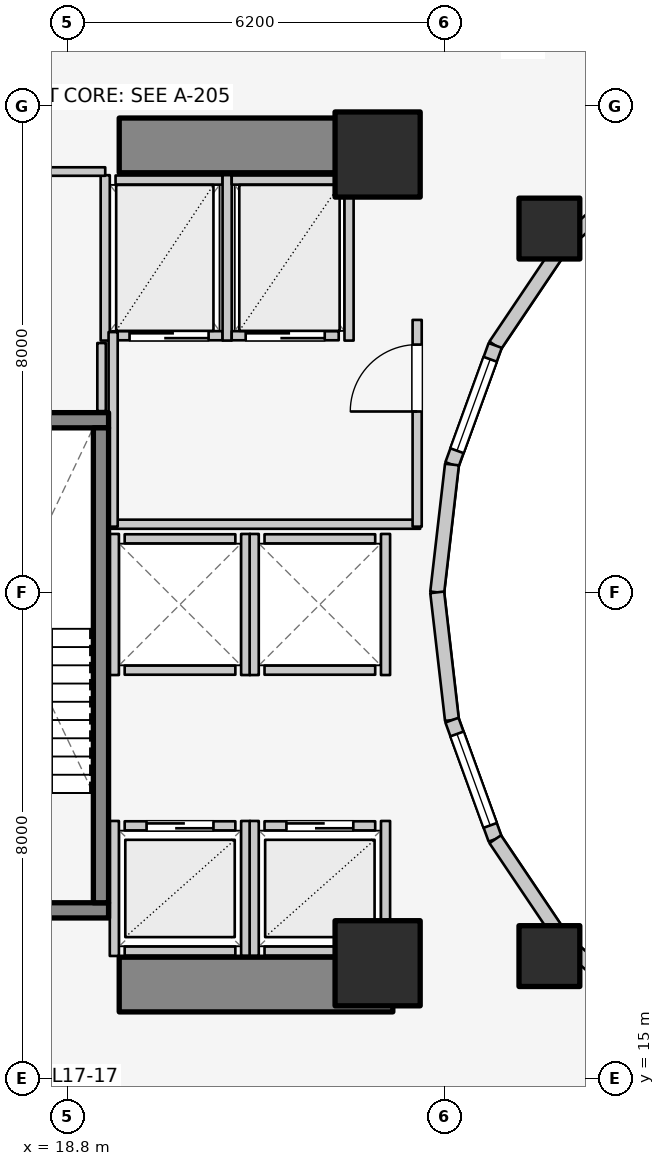
"""IFC4 building model, lengths in metres.
Left out: names, types, materials, properties, quantities, classifications, styles, units other than length and angle.
Written with IfcOpenShell. Run it as: python <this file> out.ifc"""

import sys

from ifc_helpers import new_model, si_unit, direction, frame, frame_2d, origin, origin_2d, place, context, subcontext, project, spatial, rectangle, extrude, element, fill, save


model = new_model("IFC4")
c1 = context("Model", 3, precision=1e-05, world=origin(), true_north=direction((0.0, 1.0)))
c2 = subcontext(c1, "Body", "Model", "MODEL_VIEW")
j1 = project(units=[si_unit("LENGTHUNIT", "METRE"), si_unit("PLANEANGLEUNIT", "RADIAN")], contexts=[c1])
p1 = place(None, origin())
s1 = spatial("IfcSite", under=j1, at=p1, CompositionType="ELEMENT")
p2 = place(p1, origin())
s2 = spatial("IfcBuilding", under=s1, at=p2, CompositionType="ELEMENT")
p3 = place(p2, frame((0.0, 0.0, 58.6)))
s3 = spatial("IfcBuildingStorey", under=s2, at=p3, CompositionType="ELEMENT", Elevation=58.6)
for number, where, z_axis, x_axis in (
    (1, (19.65, 16.55, 0.0), (0.0, 0.0, 1.0), (1.0, 0.0, 0.0)),
    (2, (19.65, 30.35, 0.0), (0.0, 0.0, 1.0), (1.0, 0.0, 0.0)),
):
    element("IfcWall", number, at=place(p3, frame(where, z_axis=z_axis, x_axis=x_axis)), inside=s3, PredefinedType="SHEAR", context=c2, shape_type="SweptSolid", body=[
        extrude(rectangle(XDim=4.5, YDim=0.9, at=frame_2d((2.25, 0.0))), origin(), (0.0, 0.0, 1.0), 3.1),
    ])
p4 = place(p3, frame((16.105, 17.77, 0.0), z_axis=(0.0, 0.0, 1.0), x_axis=(1.0, 0.0, 0.0)))
e3 = element("IfcWall", 3, at=p4, inside=s3, PredefinedType="SOLIDWALL", context=c2, shape_type="SweptSolid", body=[
    extrude(rectangle(XDim=3.37, YDim=0.25, at=frame_2d((1.685, 0.0))), origin(), (0.0, 0.0, 1.0), 3.1),
])
p5 = place(p4, frame((1.135, 0.0, 0.0)))
e4 = element("IfcOpeningElement", 4, at=p5, cuts=e3, PredefinedType="OPENING", context=c2, shape_type="SweptSolid", body=[
    extrude(rectangle(XDim=1.1, YDim=2.1, at=frame_2d((0.55, 1.05))), frame((0.0, 0.135, 0.0), z_axis=(0.0, -1.0, 0.0), x_axis=(1.0, 0.0, 0.0)), (0.0, 0.0, 1.0), 0.27),
])
p6 = place(p3, frame((16.105, 25.83, 0.0), z_axis=(0.0, 0.0, 1.0), x_axis=(1.0, 0.0, 0.0)))
e5 = element("IfcWall", 5, at=p6, inside=s3, PredefinedType="SOLIDWALL", context=c2, shape_type="SweptSolid", body=[
    extrude(rectangle(XDim=3.37, YDim=0.25, at=frame_2d((1.685, 0.0))), origin(), (0.0, 0.0, 1.0), 3.1),
])
p7 = place(p3, frame((19.35, 17.895, 0.0), z_axis=(0.0, 0.0, 1.0), x_axis=(0.0, 1.0, 0.0)))
e6 = element("IfcWall", 6, at=p7, inside=s3, PredefinedType="SOLIDWALL", context=c2, shape_type="SweptSolid", body=[
    extrude(rectangle(XDim=7.81, YDim=0.25, at=frame_2d((3.905, 0.0))), origin(), (0.0, 0.0, 1.0), 3.1),
])
for number, where, z_axis, x_axis in (
    (7, (23.9, 16.9, 0.0), (0.0, 0.0, 1.0), (1.0, 0.0, 0.0)),
    (8, (23.9, 30.2, 0.0), (0.0, 0.0, 1.0), (1.0, 0.0, 0.0)),
):
    element("IfcColumn", number, at=place(p3, frame(where, z_axis=z_axis, x_axis=x_axis)), inside=s3, PredefinedType="COLUMN", context=c2, shape_type="SweptSolid", body=[
        extrude(rectangle(XDim=1.4, YDim=1.4, at=origin_2d()), origin(), (0.0, 0.0, 1.0), 3.1),
    ])
for number, where, z_axis, x_axis in (
    (9, (26.725, 28.982, 0.0), (0.0, 0.0, 1.0), (1.0, 0.0, 0.0)),
    (10, (26.725, 17.018, 0.0), (0.0, 0.0, 1.0), (1.0, 0.0, 0.0)),
):
    element("IfcColumn", number, at=place(p3, frame(where, z_axis=z_axis, x_axis=x_axis)), inside=s3, PredefinedType="COLUMN", context=c2, shape_type="SweptSolid", body=[
        extrude(rectangle(XDim=1.0, YDim=1.0, at=origin_2d()), origin(), (0.0, 0.0, 1.0), 3.1),
    ])
p8 = place(p3, frame((28.44, 30.032, 0.0), z_axis=(0.0, 0.0, 1.0), x_axis=(-0.752576694707, -0.658504607869, 0.0)))
e11 = element("IfcWall", 11, at=p8, inside=s3, PredefinedType="STANDARD", context=c2, shape_type="SweptSolid", body=[
    extrude(rectangle(XDim=1.959, YDim=0.23, at=frame_2d((0.98, 0.0))), origin(), (0.0, 0.0, 1.0), 2.16),
])
p9 = place(p3, frame((26.965, 28.742, 0.0), z_axis=(0.0, 0.0, 1.0), x_axis=(-0.558197800898, -0.829707909492, 0.0)))
e12 = element("IfcWall", 12, at=p9, inside=s3, PredefinedType="STANDARD", context=c2, shape_type="SweptSolid", body=[
    extrude(rectangle(XDim=2.027, YDim=0.23, at=frame_2d((1.013, 0.0))), origin(), (0.0, 0.0, 1.0), 2.16),
])
p10 = place(p3, frame((25.834, 27.06, 0.0), z_axis=(0.0, 0.0, 1.0), x_axis=(-0.341423187295, -0.93990968033, 0.0)))
e13 = element("IfcWall", 13, at=p10, inside=s3, PredefinedType="STANDARD", context=c2, shape_type="SweptSolid", body=[
    extrude(rectangle(XDim=2.084, YDim=0.23, at=frame_2d((1.042, 0.0))), origin(), (0.0, 0.0, 1.0), 2.84),
])
p11 = place(p10, frame((0.242, 0.0, 0.85)))
e14 = element("IfcOpeningElement", 14, at=p11, cuts=e13, PredefinedType="OPENING", context=c2, shape_type="SweptSolid", body=[
    extrude(rectangle(XDim=1.6, YDim=1.65, at=frame_2d((0.8, 0.825))), frame((0.0, 0.125, 0.0), z_axis=(0.0, -1.0, 0.0), x_axis=(1.0, 0.0, 0.0)), (0.0, 0.0, 1.0), 0.25),
])
for number, where, z_axis, x_axis in (
    (15, (25.123, 25.102, 0.0), (0.0, 0.0, 1.0), (-0.115, -0.993, 0.0)),
    (16, (24.88, 23.0, 0.0), (0.0, 0.0, 1.0), (0.115, -0.993, 0.0)),
):
    element("IfcWall", number, at=place(p3, frame(where, z_axis=z_axis, x_axis=x_axis)), inside=s3, PredefinedType="STANDARD", context=c2, shape_type="SweptSolid", body=[
        extrude(rectangle(XDim=2.115, YDim=0.23, at=frame_2d((1.058, 0.0))), origin(), (0.0, 0.0, 1.0), 2.84),
    ])
p12 = place(p3, frame((25.123, 20.898, 0.0), z_axis=(0.0, 0.0, 1.0), x_axis=(0.341423187295, -0.93990968033, 0.0)))
e17 = element("IfcWall", 17, at=p12, inside=s3, PredefinedType="STANDARD", context=c2, shape_type="SweptSolid", body=[
    extrude(rectangle(XDim=2.084, YDim=0.23, at=frame_2d((1.042, 0.0))), origin(), (0.0, 0.0, 1.0), 2.84),
])
p13 = place(p12, frame((0.242, 0.0, 0.85)))
e18 = element("IfcOpeningElement", 18, at=p13, cuts=e17, PredefinedType="OPENING", context=c2, shape_type="SweptSolid", body=[
    extrude(rectangle(XDim=1.6, YDim=1.65, at=frame_2d((0.8, 0.825))), frame((0.0, 0.125, 0.0), z_axis=(0.0, -1.0, 0.0), x_axis=(1.0, 0.0, 0.0)), (0.0, 0.0, 1.0), 0.25),
])
p14 = place(p3, frame((25.834, 18.94, 0.0), z_axis=(0.0, 0.0, 1.0), x_axis=(0.558197800898, -0.829707909492, 0.0)))
e19 = element("IfcWall", 19, at=p14, inside=s3, PredefinedType="STANDARD", context=c2, shape_type="SweptSolid", body=[
    extrude(rectangle(XDim=2.027, YDim=0.23, at=frame_2d((1.013, 0.0))), origin(), (0.0, 0.0, 1.0), 2.16),
])
p15 = place(p3, frame((26.965, 17.258, 0.0), z_axis=(0.0, 0.0, 1.0), x_axis=(0.752576694707, -0.658504607869, 0.0)))
e20 = element("IfcWall", 20, at=p15, inside=s3, PredefinedType="STANDARD", context=c2, shape_type="SweptSolid", body=[
    extrude(rectangle(XDim=1.959, YDim=0.23, at=frame_2d((0.98, 0.0))), origin(), (0.0, 0.0, 1.0), 2.16),
])
p16 = place(p3, frame((19.74, 19.16, 0.0), z_axis=(0.0, 0.0, 1.0), x_axis=(1.0, 0.0, 0.0)))
e21 = element("IfcWall", 21, at=p16, inside=s3, PredefinedType="SOLIDWALL", context=c2, shape_type="SweptSolid", body=[
    extrude(rectangle(XDim=1.82, YDim=0.15, at=frame_2d((0.91, 0.0))), origin(), (0.0, 0.0, 1.0), 2.855),
])
p17 = place(p16, frame((0.36, 0.0, 0.0)))
e22 = element("IfcOpeningElement", 22, at=p17, cuts=e21, PredefinedType="OPENING", context=c2, shape_type="SweptSolid", body=[
    extrude(rectangle(XDim=1.1, YDim=2.1, at=frame_2d((0.55, 1.05))), frame((0.0, 0.085, 0.0), z_axis=(0.0, -1.0, 0.0), x_axis=(1.0, 0.0, 0.0)), (0.0, 0.0, 1.0), 0.17),
])
p18 = place(p3, frame((19.74, 17.1, 0.0), z_axis=(0.0, 0.0, 1.0), x_axis=(1.0, 0.0, 0.0)))
e23 = element("IfcWall", 23, at=p18, inside=s3, PredefinedType="SOLIDWALL", context=c2, shape_type="SweptSolid", body=[
    extrude(rectangle(XDim=1.82, YDim=0.15, at=frame_2d((0.91, 0.0))), origin(), (0.0, 0.0, 1.0), 2.855),
])
p19 = place(p3, frame((19.57, 17.02, 0.0), z_axis=(0.0, 0.0, 1.0), x_axis=(0.0, 1.0, 0.0)))
e24 = element("IfcWall", 24, at=p19, inside=s3, PredefinedType="SOLIDWALL", context=c2, shape_type="SweptSolid", body=[
    extrude(rectangle(XDim=2.22, YDim=0.15, at=frame_2d((1.11, 0.0))), origin(), (0.0, 0.0, 1.0), 2.12),
])
p20 = place(p3, frame((21.73, 17.02, 0.0), z_axis=(0.0, 0.0, 1.0), x_axis=(0.0, 1.0, 0.0)))
e25 = element("IfcWall", 25, at=p20, inside=s3, PredefinedType="SOLIDWALL", context=c2, shape_type="SweptSolid", body=[
    extrude(rectangle(XDim=2.22, YDim=0.15, at=frame_2d((1.11, 0.0))), origin(), (0.0, 0.0, 1.0), 2.855),
])
p21 = place(p3, frame((22.04, 19.16, 0.0), z_axis=(0.0, 0.0, 1.0), x_axis=(1.0, 0.0, 0.0)))
e26 = element("IfcWall", 26, at=p21, inside=s3, PredefinedType="SOLIDWALL", context=c2, shape_type="SweptSolid", body=[
    extrude(rectangle(XDim=1.82, YDim=0.15, at=frame_2d((0.91, 0.0))), origin(), (0.0, 0.0, 1.0), 2.12),
])
p22 = place(p21, frame((0.36, 0.0, 0.0)))
e27 = element("IfcOpeningElement", 27, at=p22, cuts=e26, PredefinedType="OPENING", context=c2, shape_type="SweptSolid", body=[
    extrude(rectangle(XDim=1.1, YDim=2.1, at=frame_2d((0.55, 1.05))), frame((0.0, 0.085, 0.0), z_axis=(0.0, -1.0, 0.0), x_axis=(1.0, 0.0, 0.0)), (0.0, 0.0, 1.0), 0.17),
])
p23 = place(p3, frame((22.04, 17.1, 0.0), z_axis=(0.0, 0.0, 1.0), x_axis=(1.0, 0.0, 0.0)))
e28 = element("IfcWall", 28, at=p23, inside=s3, PredefinedType="SOLIDWALL", context=c2, shape_type="SweptSolid", body=[
    extrude(rectangle(XDim=1.82, YDim=0.15, at=frame_2d((0.91, 0.0))), origin(), (0.0, 0.0, 1.0), 2.12),
])
p24 = place(p3, frame((21.87, 17.02, 0.0), z_axis=(0.0, 0.0, 1.0), x_axis=(0.0, 1.0, 0.0)))
e29 = element("IfcWall", 29, at=p24, inside=s3, PredefinedType="SOLIDWALL", context=c2, shape_type="SweptSolid", body=[
    extrude(rectangle(XDim=2.22, YDim=0.15, at=frame_2d((1.11, 0.0))), origin(), (0.0, 0.0, 1.0), 2.855),
])
p25 = place(p3, frame((24.03, 17.02, 0.0), z_axis=(0.0, 0.0, 1.0), x_axis=(0.0, 1.0, 0.0)))
e30 = element("IfcWall", 30, at=p25, inside=s3, PredefinedType="SOLIDWALL", context=c2, shape_type="SweptSolid", body=[
    extrude(rectangle(XDim=2.22, YDim=0.15, at=frame_2d((1.11, 0.0))), origin(), (0.0, 0.0, 1.0), 2.12),
])
for number, where, z_axis, x_axis in (
    (31, (19.74, 21.72, 0.0), (0.0, 0.0, 1.0), (1.0, 0.0, 0.0)),
    (32, (19.74, 23.88, 0.0), (0.0, 0.0, 1.0), (1.0, 0.0, 0.0)),
):
    element("IfcWall", number, at=place(p3, frame(where, z_axis=z_axis, x_axis=x_axis)), inside=s3, PredefinedType="SOLIDWALL", context=c2, shape_type="SweptSolid", body=[
        extrude(rectangle(XDim=1.82, YDim=0.15, at=frame_2d((0.91, 0.0))), origin(), (0.0, 0.0, 1.0), 2.855),
    ])
for number, where, z_axis, x_axis in (
    (33, (19.57, 21.64, 0.0), (0.0, 0.0, 1.0), (0.0, 1.0, 0.0)),
    (34, (21.73, 21.64, 0.0), (0.0, 0.0, 1.0), (0.0, 1.0, 0.0)),
):
    element("IfcWall", number, at=place(p3, frame(where, z_axis=z_axis, x_axis=x_axis)), inside=s3, PredefinedType="SOLIDWALL", context=c2, shape_type="SweptSolid", body=[
        extrude(rectangle(XDim=2.32, YDim=0.15, at=frame_2d((1.16, 0.0))), origin(), (0.0, 0.0, 1.0), 2.855),
    ])
for number, where, z_axis, x_axis in (
    (35, (22.04, 21.72, 0.0), (0.0, 0.0, 1.0), (1.0, 0.0, 0.0)),
    (36, (22.04, 23.88, 0.0), (0.0, 0.0, 1.0), (1.0, 0.0, 0.0)),
):
    element("IfcWall", number, at=place(p3, frame(where, z_axis=z_axis, x_axis=x_axis)), inside=s3, PredefinedType="SOLIDWALL", context=c2, shape_type="SweptSolid", body=[
        extrude(rectangle(XDim=1.82, YDim=0.15, at=frame_2d((0.91, 0.0))), origin(), (0.0, 0.0, 1.0), 2.12),
    ])
p26 = place(p3, frame((21.87, 21.64, 0.0), z_axis=(0.0, 0.0, 1.0), x_axis=(0.0, 1.0, 0.0)))
e37 = element("IfcWall", 37, at=p26, inside=s3, PredefinedType="SOLIDWALL", context=c2, shape_type="SweptSolid", body=[
    extrude(rectangle(XDim=2.32, YDim=0.15, at=frame_2d((1.16, 0.0))), origin(), (0.0, 0.0, 1.0), 2.855),
])
p27 = place(p3, frame((24.03, 21.64, 0.0), z_axis=(0.0, 0.0, 1.0), x_axis=(0.0, 1.0, 0.0)))
e38 = element("IfcWall", 38, at=p27, inside=s3, PredefinedType="SOLIDWALL", context=c2, shape_type="SweptSolid", body=[
    extrude(rectangle(XDim=2.32, YDim=0.15, at=frame_2d((1.16, 0.0))), origin(), (0.0, 0.0, 1.0), 2.12),
])
p28 = place(p3, frame((19.59, 27.22, 0.0), z_axis=(0.0, 0.0, 1.0), x_axis=(1.0, 0.0, 0.0)))
e39 = element("IfcWall", 39, at=p28, inside=s3, PredefinedType="SOLIDWALL", context=c2, shape_type="SweptSolid", body=[
    extrude(rectangle(XDim=1.76, YDim=0.15, at=frame_2d((0.88, 0.0))), origin(), (0.0, 0.0, 1.0), 2.855),
])
p29 = place(p28, frame((0.23, 0.0, 0.0)))
e40 = element("IfcOpeningElement", 40, at=p29, cuts=e39, PredefinedType="OPENING", context=c2, shape_type="SweptSolid", body=[
    extrude(rectangle(XDim=1.3, YDim=2.1, at=frame_2d((0.65, 1.05))), frame((0.0, 0.085, 0.0), z_axis=(0.0, -1.0, 0.0), x_axis=(1.0, 0.0, 0.0)), (0.0, 0.0, 1.0), 0.17),
])
p30 = place(p3, frame((19.59, 29.78, 0.0), z_axis=(0.0, 0.0, 1.0), x_axis=(1.0, 0.0, 0.0)))
e41 = element("IfcWall", 41, at=p30, inside=s3, PredefinedType="SOLIDWALL", context=c2, shape_type="SweptSolid", body=[
    extrude(rectangle(XDim=1.76, YDim=0.15, at=frame_2d((0.88, 0.0))), origin(), (0.0, 0.0, 1.0), 2.855),
])
for number, where, z_axis, x_axis in (
    (42, (19.42, 27.14, 0.0), (0.0, 0.0, 1.0), (0.0, 1.0, 0.0)),
    (43, (21.425, 27.14, 0.0), (0.0, 0.0, 1.0), (0.0, 1.0, 0.0)),
):
    element("IfcWall", number, at=place(p3, frame(where, z_axis=z_axis, x_axis=x_axis)), inside=s3, PredefinedType="SOLIDWALL", context=c2, shape_type="SweptSolid", body=[
        extrude(rectangle(XDim=2.72, YDim=0.15, at=frame_2d((1.36, 0.0))), origin(), (0.0, 0.0, 1.0), 2.855),
    ])
p31 = place(p3, frame((21.5, 27.22, 0.0), z_axis=(0.0, 0.0, 1.0), x_axis=(1.0, 0.0, 0.0)))
e44 = element("IfcWall", 44, at=p31, inside=s3, PredefinedType="SOLIDWALL", context=c2, shape_type="SweptSolid", body=[
    extrude(rectangle(XDim=1.76, YDim=0.15, at=frame_2d((0.88, 0.0))), origin(), (0.0, 0.0, 1.0), 2.855),
])
p32 = place(p31, frame((0.23, 0.0, 0.0)))
e45 = element("IfcOpeningElement", 45, at=p32, cuts=e44, PredefinedType="OPENING", context=c2, shape_type="SweptSolid", body=[
    extrude(rectangle(XDim=1.3, YDim=2.1, at=frame_2d((0.65, 1.05))), frame((0.0, 0.085, 0.0), z_axis=(0.0, -1.0, 0.0), x_axis=(1.0, 0.0, 0.0)), (0.0, 0.0, 1.0), 0.17),
])
p33 = place(p3, frame((21.5, 29.78, 0.0), z_axis=(0.0, 0.0, 1.0), x_axis=(1.0, 0.0, 0.0)))
e46 = element("IfcWall", 46, at=p33, inside=s3, PredefinedType="SOLIDWALL", context=c2, shape_type="SweptSolid", body=[
    extrude(rectangle(XDim=1.76, YDim=0.15, at=frame_2d((0.88, 0.0))), origin(), (0.0, 0.0, 1.0), 2.855),
])
p34 = place(p3, frame((23.43, 27.14, 0.0), z_axis=(0.0, 0.0, 1.0), x_axis=(0.0, 1.0, 0.0)))
e47 = element("IfcWall", 47, at=p34, inside=s3, PredefinedType="SOLIDWALL", context=c2, shape_type="SweptSolid", body=[
    extrude(rectangle(XDim=2.72, YDim=0.15, at=frame_2d((1.36, 0.0))), origin(), (0.0, 0.0, 1.0), 2.855),
])
p35 = place(p3, frame((19.52, 24.12, 0.0), z_axis=(0.0, 0.0, 1.0), x_axis=(1.0, 0.0, 0.0)))
e48 = element("IfcWall", 48, at=p35, inside=s3, PredefinedType="PARTITIONING", context=c2, shape_type="SweptSolid", body=[
    extrude(rectangle(XDim=5.08, YDim=0.15, at=frame_2d((2.54, 0.0))), origin(), (0.0, 0.0, 1.0), 2.12),
])
p36 = place(p3, frame((19.55, 24.08, 0.0), z_axis=(0.0, 0.0, 1.0), x_axis=(0.0, 1.0, 0.0)))
e49 = element("IfcWall", 49, at=p36, inside=s3, PredefinedType="PARTITIONING", context=c2, shape_type="SweptSolid", body=[
    extrude(rectangle(XDim=3.2, YDim=0.15, at=frame_2d((1.6, 0.0))), origin(), (0.0, 0.0, 1.0), 2.855),
])
p37 = place(p3, frame((24.55, 24.08, 0.0), z_axis=(0.0, 0.0, 1.0), x_axis=(0.0, 1.0, 0.0)))
e50 = element("IfcWall", 50, at=p37, inside=s3, PredefinedType="PARTITIONING", context=c2, shape_type="SweptSolid", body=[
    extrude(rectangle(XDim=3.4, YDim=0.15, at=frame_2d((1.7, 0.0))), origin(), (0.0, 0.0, 1.0), 2.855),
])
p38 = place(p37, frame((1.894, 0.0, 0.0)))
e51 = element("IfcOpeningElement", 51, at=p38, cuts=e50, PredefinedType="OPENING", context=c2, shape_type="SweptSolid", body=[
    extrude(rectangle(XDim=1.1, YDim=2.1, at=frame_2d((0.55, 1.05))), frame((0.0, 0.085, 0.0), z_axis=(0.0, -1.0, 0.0), x_axis=(1.0, 0.0, 0.0)), (0.0, 0.0, 1.0), 0.17),
])
p39 = place(p3, frame((16.12, 29.92, 0.0), z_axis=(0.0, 0.0, 1.0), x_axis=(1.0, 0.0, 0.0)))
e52 = element("IfcWall", 52, at=p39, inside=s3, PredefinedType="PLUMBINGWALL", context=c2, shape_type="SweptSolid", body=[
    extrude(rectangle(XDim=3.3, YDim=0.14, at=frame_2d((1.65, 0.0))), origin(), (0.0, 0.0, 1.0), 2.855),
])
p40 = place(p39, frame((1.516, 0.0, 0.0)))
e53 = element("IfcOpeningElement", 53, at=p40, cuts=e52, PredefinedType="OPENING", context=c2, shape_type="SweptSolid", body=[
    extrude(rectangle(XDim=0.85, YDim=2.05, at=frame_2d((0.425, 1.025))), frame((0.0, 0.08, 0.0), z_axis=(0.0, -1.0, 0.0), x_axis=(1.0, 0.0, 0.0)), (0.0, 0.0, 1.0), 0.16),
])
p41 = place(p3, frame((19.36, 25.98, 0.0), z_axis=(0.0, 0.0, 1.0), x_axis=(0.0, 1.0, 0.0)))
e54 = element("IfcWall", 54, at=p41, inside=s3, PredefinedType="PLUMBINGWALL", context=c2, shape_type="SweptSolid", body=[
    extrude(rectangle(XDim=1.12, YDim=0.14, at=frame_2d((0.56, 0.0))), origin(), (0.0, 0.0, 1.0), 2.855),
])
p42 = place(p11, origin())
e55 = element("IfcWindow", 55, at=p42, inside=s3, PartitioningType="SINGLE_PANEL", PredefinedType="WINDOW", context=c2, shape_type="SweptSolid", body=[
    extrude(rectangle(XDim=1.6, YDim=1.65, at=frame_2d((0.8, 0.825))), frame((0.0, 0.03, 0.0), z_axis=(0.0, -1.0, 0.0), x_axis=(1.0, 0.0, 0.0)), (0.0, 0.0, 1.0), 0.06),
])
fill(e14, e55)
p43 = place(p13, origin())
e56 = element("IfcWindow", 56, at=p43, inside=s3, PartitioningType="SINGLE_PANEL", PredefinedType="WINDOW", context=c2, shape_type="SweptSolid", body=[
    extrude(rectangle(XDim=1.6, YDim=1.65, at=frame_2d((0.8, 0.825))), frame((0.0, 0.03, 0.0), z_axis=(0.0, -1.0, 0.0), x_axis=(1.0, 0.0, 0.0)), (0.0, 0.0, 1.0), 0.06),
])
fill(e18, e56)
p44 = place(p17, origin())
e57 = element("IfcDoor", 57, at=p44, inside=s3, OperationType="DOUBLE_DOOR_SLIDING", PredefinedType="DOOR", context=c2, shape_type="SweptSolid", body=[
    extrude(rectangle(XDim=1.1, YDim=2.1, at=frame_2d((0.55, 1.05))), frame((0.0, 0.025, 0.0), z_axis=(0.0, -1.0, 0.0), x_axis=(1.0, 0.0, 0.0)), (0.0, 0.0, 1.0), 0.05),
])
fill(e22, e57)
p45 = place(p22, origin())
e58 = element("IfcDoor", 58, at=p45, inside=s3, OperationType="DOUBLE_DOOR_SLIDING", PredefinedType="DOOR", context=c2, shape_type="SweptSolid", body=[
    extrude(rectangle(XDim=1.1, YDim=2.1, at=frame_2d((0.55, 1.05))), frame((0.0, 0.025, 0.0), z_axis=(0.0, -1.0, 0.0), x_axis=(1.0, 0.0, 0.0)), (0.0, 0.0, 1.0), 0.05),
])
fill(e27, e58)
p46 = place(p29, origin())
e59 = element("IfcDoor", 59, at=p46, inside=s3, OperationType="DOUBLE_DOOR_SLIDING", PredefinedType="DOOR", context=c2, shape_type="SweptSolid", body=[
    extrude(rectangle(XDim=1.3, YDim=2.1, at=frame_2d((0.65, 1.05))), frame((0.0, 0.025, 0.0), z_axis=(0.0, -1.0, 0.0), x_axis=(1.0, 0.0, 0.0)), (0.0, 0.0, 1.0), 0.05),
])
fill(e40, e59)
p47 = place(p32, origin())
e60 = element("IfcDoor", 60, at=p47, inside=s3, OperationType="DOUBLE_DOOR_SLIDING", PredefinedType="DOOR", context=c2, shape_type="SweptSolid", body=[
    extrude(rectangle(XDim=1.3, YDim=2.1, at=frame_2d((0.65, 1.05))), frame((0.0, 0.025, 0.0), z_axis=(0.0, -1.0, 0.0), x_axis=(1.0, 0.0, 0.0)), (0.0, 0.0, 1.0), 0.05),
])
fill(e45, e60)
p48 = place(p38, origin())
e61 = element("IfcDoor", 61, at=p48, inside=s3, OperationType="SINGLE_SWING_LEFT", PredefinedType="DOOR", context=c2, shape_type="SweptSolid", body=[
    extrude(rectangle(XDim=1.1, YDim=2.1, at=frame_2d((0.55, 1.05))), frame((0.0, 0.025, 0.0), z_axis=(0.0, -1.0, 0.0), x_axis=(1.0, 0.0, 0.0)), (0.0, 0.0, 1.0), 0.05),
])
fill(e51, e61)
save(model, sys.argv[1])
